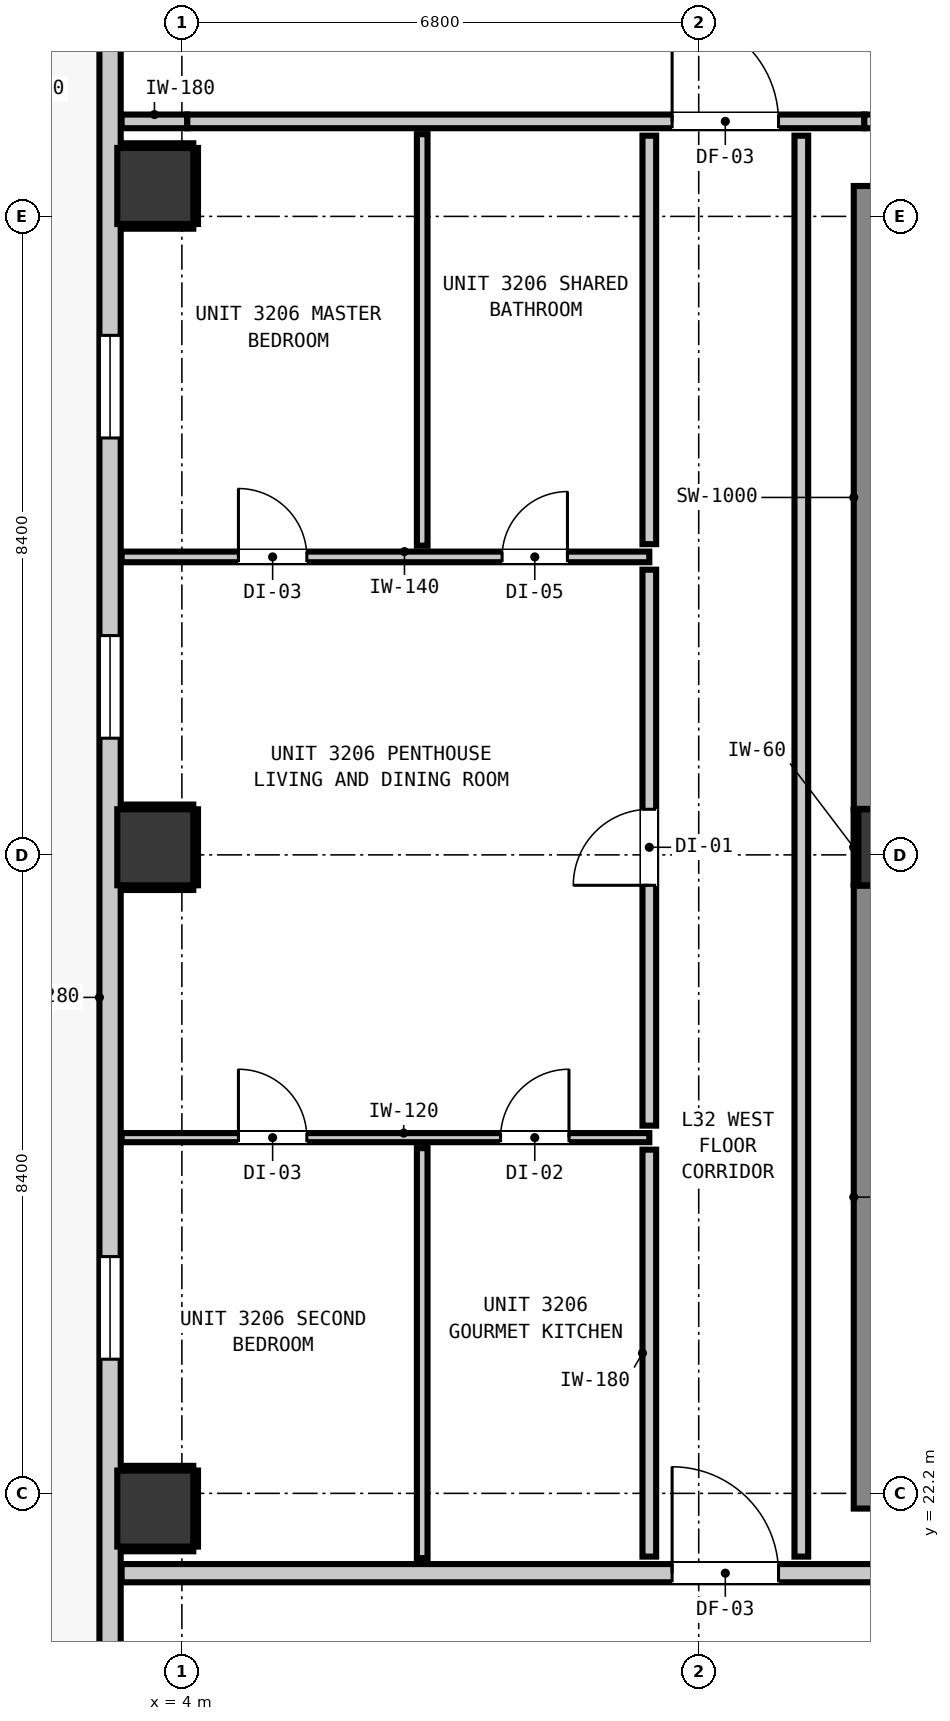
"""IFC4 building model, lengths in metres.
Left out: names, types, materials, properties, quantities, classifications, styles, units other than length and angle.
Written with IfcOpenShell. Run it as: python <this file> out.ifc"""

import sys

from ifc_helpers import new_model, si_unit, direction, frame, frame_2d, origin, origin_2d, place, context, subcontext, project, spatial, rectangle, extrude, element, fill, save


model = new_model("IFC4")
c1 = context("Model", 3, precision=1e-05, world=origin(), true_north=direction((0.0, 1.0)))
c2 = subcontext(c1, "Body", "Model", "MODEL_VIEW")
j1 = project(units=[si_unit("LENGTHUNIT", "METRE"), si_unit("PLANEANGLEUNIT", "RADIAN")], contexts=[c1])
p1 = place(None, origin())
s1 = spatial("IfcSite", under=j1, at=p1, CompositionType="ELEMENT")
p2 = place(p1, origin())
s2 = spatial("IfcBuilding", under=s1, at=p2, CompositionType="ELEMENT")
p3 = place(p2, frame((0.0, 0.0, 112.72)))
s3 = spatial("IfcBuildingStorey", under=s2, at=p3, CompositionType="ELEMENT", Elevation=112.72)
p4 = place(p3, frame((13.4, 30.7, 0.0), z_axis=(0.0, 0.0, 1.0), x_axis=(1.0, 0.0, 0.0)))
e1 = element("IfcColumn", 1, at=p4, inside=s3, PredefinedType="COLUMN", context=c2, shape_type="SweptSolid", body=[
    extrude(rectangle(XDim=1.0, YDim=1.0, at=origin_2d()), origin(), (0.0, 0.0, 1.0), 3.32),
])
p5 = place(p3, frame((13.34, 22.0, 0.0), z_axis=(0.0, 0.0, 1.0), x_axis=(0.0, 1.0, 0.0)))
e2 = element("IfcWall", 2, at=p5, inside=s3, PredefinedType="SHEAR", context=c2, shape_type="SweptSolid", body=[
    extrude(rectangle(XDim=8.195, YDim=1.0, at=frame_2d((4.098, 0.0))), origin(), (0.0, 0.0, 1.0), 3.32),
])
p6 = place(p3, frame((13.34, 31.205, 0.0), z_axis=(0.0, 0.0, 1.0), x_axis=(0.0, 1.0, 0.0)))
e3 = element("IfcWall", 3, at=p6, inside=s3, PredefinedType="SHEAR", context=c2, shape_type="SweptSolid", body=[
    extrude(rectangle(XDim=8.195, YDim=1.0, at=frame_2d((4.097, 0.0))), origin(), (0.0, 0.0, 1.0), 3.32),
])
for number, where, z_axis, x_axis in (
    (4, (3.65, 22.0, 0.0), (0.0, 0.0, 1.0), (1.0, 0.0, 0.0)),
    (5, (3.65, 30.7, 0.0), (0.0, 0.0, 1.0), (1.0, 0.0, 0.0)),
    (6, (3.65, 39.4, 0.0), (0.0, 0.0, 1.0), (1.0, 0.0, 0.0)),
):
    element("IfcColumn", number, at=place(p3, frame(where, z_axis=z_axis, x_axis=x_axis)), inside=s3, PredefinedType="COLUMN", context=c2, shape_type="SweptSolid", body=[
        extrude(rectangle(XDim=1.0, YDim=1.0, at=origin_2d()), origin(), (0.0, 0.0, 1.0), 3.32),
    ])
p7 = place(p3, frame((3.055, 11.355, 0.0), z_axis=(0.0, 0.0, 1.0), x_axis=(0.0, 1.0, 0.0)))
e7 = element("IfcWall", 7, at=p7, inside=s3, PredefinedType="STANDARD", context=c2, shape_type="SweptSolid", body=[
    extrude(rectangle(XDim=32.29, YDim=0.28, at=frame_2d((16.145, 0.0))), origin(), (0.0, 0.0, 1.0), 3.08),
])
p8 = place(p7, frame((5.818, 0.0, 0.0)))
e8 = element("IfcOpeningElement", 8, at=p8, cuts=e7, PredefinedType="OPENING", context=c2, shape_type="SweptSolid", body=[
    extrude(rectangle(XDim=1.0, YDim=2.15, at=frame_2d((0.5, 1.075))), frame((0.0, 0.15, 0.0), z_axis=(0.0, -1.0, 0.0), x_axis=(1.0, 0.0, 0.0)), (0.0, 0.0, 1.0), 0.3),
])
p9 = place(p7, frame((0.395, 0.0, 0.85)))
e9 = element("IfcOpeningElement", 9, at=p9, cuts=e7, PredefinedType="OPENING", context=c2, shape_type="SweptSolid", body=[
    extrude(rectangle(XDim=1.35, YDim=1.85, at=frame_2d((0.675, 0.925))), frame((0.0, 0.15, 0.0), z_axis=(0.0, -1.0, 0.0), x_axis=(1.0, 0.0, 0.0)), (0.0, 0.0, 1.0), 0.3),
])
p10 = place(p7, frame((20.78, 0.0, 0.85)))
e10 = element("IfcOpeningElement", 10, at=p10, cuts=e7, PredefinedType="OPENING", context=c2, shape_type="SweptSolid", body=[
    extrude(rectangle(XDim=1.35, YDim=1.85, at=frame_2d((0.675, 0.925))), frame((0.0, 0.15, 0.0), z_axis=(0.0, -1.0, 0.0), x_axis=(1.0, 0.0, 0.0)), (0.0, 0.0, 1.0), 0.3),
])
p11 = place(p7, frame((12.61, 0.0, 0.85)))
e11 = element("IfcOpeningElement", 11, at=p11, cuts=e7, PredefinedType="OPENING", context=c2, shape_type="SweptSolid", body=[
    extrude(rectangle(XDim=1.35, YDim=1.85, at=frame_2d((0.675, 0.925))), frame((0.0, 0.15, 0.0), z_axis=(0.0, -1.0, 0.0), x_axis=(1.0, 0.0, 0.0)), (0.0, 0.0, 1.0), 0.3),
])
p12 = place(p7, frame((24.73, 0.0, 0.85)))
e12 = element("IfcOpeningElement", 12, at=p12, cuts=e7, PredefinedType="OPENING", context=c2, shape_type="SweptSolid", body=[
    extrude(rectangle(XDim=1.35, YDim=1.85, at=frame_2d((0.675, 0.925))), frame((0.0, 0.15, 0.0), z_axis=(0.0, -1.0, 0.0), x_axis=(1.0, 0.0, 0.0)), (0.0, 0.0, 1.0), 0.3),
])
p13 = place(p3, frame((3.207, 21.15, 0.0), z_axis=(0.0, 0.0, 1.0), x_axis=(1.0, 0.0, 0.0)))
e13 = element("IfcWall", 13, at=p13, inside=s3, PredefinedType="PARTITIONING", context=c2, shape_type="SweptSolid", body=[
    extrude(rectangle(XDim=39.386, YDim=0.24, at=frame_2d((19.693, 0.0))), origin(), (0.0, 0.0, 1.0), 3.08),
])
p14 = place(p13, frame((15.003, 0.0, 0.0)))
e14 = element("IfcOpeningElement", 14, at=p14, cuts=e13, PredefinedType="OPENING", context=c2, shape_type="SweptSolid", body=[
    extrude(rectangle(XDim=1.1, YDim=2.15, at=frame_2d((0.55, 1.075))), frame((0.0, 0.13, 0.0), z_axis=(0.0, -1.0, 0.0), x_axis=(1.0, 0.0, 0.0)), (0.0, 0.0, 1.0), 0.26),
])
p15 = place(p13, frame((7.243, 0.0, 0.0)))
e15 = element("IfcOpeningElement", 15, at=p15, cuts=e13, PredefinedType="OPENING", context=c2, shape_type="SweptSolid", body=[
    extrude(rectangle(XDim=1.4, YDim=2.15, at=frame_2d((0.7, 1.075))), frame((0.0, 0.13, 0.0), z_axis=(0.0, -1.0, 0.0), x_axis=(1.0, 0.0, 0.0)), (0.0, 0.0, 1.0), 0.26),
])
p16 = place(p13, frame((34.843, 0.0, 0.0)))
e16 = element("IfcOpeningElement", 16, at=p16, cuts=e13, PredefinedType="OPENING", context=c2, shape_type="SweptSolid", body=[
    extrude(rectangle(XDim=1.4, YDim=2.15, at=frame_2d((0.7, 1.075))), frame((0.0, 0.13, 0.0), z_axis=(0.0, -1.0, 0.0), x_axis=(1.0, 0.0, 0.0)), (0.0, 0.0, 1.0), 0.26),
])
p17 = place(p3, frame((3.207, 40.25, 0.0), z_axis=(0.0, 0.0, 1.0), x_axis=(1.0, 0.0, 0.0)))
e17 = element("IfcWall", 17, at=p17, inside=s3, PredefinedType="PARTITIONING", context=c2, shape_type="SweptSolid", body=[
    extrude(rectangle(XDim=0.864, YDim=0.18, at=frame_2d((0.432, 0.0))), origin(), (0.0, 0.0, 1.0), 3.08),
])
p18 = place(p3, frame((4.071, 40.25, 0.0), z_axis=(0.0, 0.0, 1.0), x_axis=(1.0, 0.0, 0.0)))
e18 = element("IfcWall", 18, at=p18, inside=s3, PredefinedType="PARTITIONING", context=c2, shape_type="SweptSolid", body=[
    extrude(rectangle(XDim=8.908, YDim=0.18, at=frame_2d((4.454, 0.0))), origin(), (0.0, 0.0, 1.0), 2.565),
])
p19 = place(p18, frame((6.379, 0.0, 0.0)))
e19 = element("IfcOpeningElement", 19, at=p19, cuts=e18, PredefinedType="OPENING", context=c2, shape_type="SweptSolid", body=[
    extrude(rectangle(XDim=1.4, YDim=2.15, at=frame_2d((0.7, 1.075))), frame((0.0, 0.1, 0.0), z_axis=(0.0, -1.0, 0.0), x_axis=(1.0, 0.0, 0.0)), (0.0, 0.0, 1.0), 0.2),
])
p20 = place(p3, frame((12.979, 40.25, 0.0), z_axis=(0.0, 0.0, 1.0), x_axis=(1.0, 0.0, 0.0)))
e20 = element("IfcWall", 20, at=p20, inside=s3, PredefinedType="PARTITIONING", context=c2, shape_type="SweptSolid", body=[
    extrude(rectangle(XDim=29.614, YDim=0.18, at=frame_2d((14.807, 0.0))), origin(), (0.0, 0.0, 1.0), 3.08),
])
p21 = place(p20, frame((4.456, 0.0, 0.0)))
e21 = element("IfcOpeningElement", 21, at=p21, cuts=e20, PredefinedType="OPENING", context=c2, shape_type="SweptSolid", body=[
    extrude(rectangle(XDim=1.4, YDim=2.15, at=frame_2d((0.7, 1.075))), frame((0.0, 0.1, 0.0), z_axis=(0.0, -1.0, 0.0), x_axis=(1.0, 0.0, 0.0)), (0.0, 0.0, 1.0), 0.2),
])
p22 = place(p20, frame((25.071, 0.0, 0.0)))
e22 = element("IfcOpeningElement", 22, at=p22, cuts=e20, PredefinedType="OPENING", context=c2, shape_type="SweptSolid", body=[
    extrude(rectangle(XDim=1.4, YDim=2.15, at=frame_2d((0.7, 1.075))), frame((0.0, 0.1, 0.0), z_axis=(0.0, -1.0, 0.0), x_axis=(1.0, 0.0, 0.0)), (0.0, 0.0, 1.0), 0.2),
])
p23 = place(p3, frame((3.207, 34.52, 0.0), z_axis=(0.0, 0.0, 1.0), x_axis=(1.0, 0.0, 0.0)))
e23 = element("IfcWall", 23, at=p23, inside=s3, PredefinedType="PARTITIONING", context=c2, shape_type="SweptSolid", body=[
    extrude(rectangle(XDim=6.943, YDim=0.14, at=frame_2d((3.471, 0.0))), origin(), (0.0, 0.0, 1.0), 3.08),
])
p24 = place(p23, frame((5.006, 0.0, 0.0)))
e24 = element("IfcOpeningElement", 24, at=p24, cuts=e23, PredefinedType="OPENING", context=c2, shape_type="SweptSolid", body=[
    extrude(rectangle(XDim=0.86, YDim=2.02, at=frame_2d((0.43, 1.01))), frame((0.0, 0.08, 0.0), z_axis=(0.0, -1.0, 0.0), x_axis=(1.0, 0.0, 0.0)), (0.0, 0.0, 1.0), 0.16),
])
p25 = place(p23, frame((1.537, 0.0, 0.0)))
e25 = element("IfcOpeningElement", 25, at=p25, cuts=e23, PredefinedType="OPENING", context=c2, shape_type="SweptSolid", body=[
    extrude(rectangle(XDim=0.9, YDim=2.1, at=frame_2d((0.45, 1.05))), frame((0.0, 0.08, 0.0), z_axis=(0.0, -1.0, 0.0), x_axis=(1.0, 0.0, 0.0)), (0.0, 0.0, 1.0), 0.16),
])
p26 = place(p3, frame((3.207, 26.88, 0.0), z_axis=(0.0, 0.0, 1.0), x_axis=(1.0, 0.0, 0.0)))
e26 = element("IfcWall", 26, at=p26, inside=s3, PredefinedType="PARTITIONING", context=c2, shape_type="SweptSolid", body=[
    extrude(rectangle(XDim=6.943, YDim=0.12, at=frame_2d((3.471, 0.0))), origin(), (0.0, 0.0, 1.0), 3.08),
])
p27 = place(p26, frame((4.986, 0.0, 0.0)))
e27 = element("IfcOpeningElement", 27, at=p27, cuts=e26, PredefinedType="OPENING", context=c2, shape_type="SweptSolid", body=[
    extrude(rectangle(XDim=0.9, YDim=2.1, at=frame_2d((0.45, 1.05))), frame((0.0, 0.07, 0.0), z_axis=(0.0, -1.0, 0.0), x_axis=(1.0, 0.0, 0.0)), (0.0, 0.0, 1.0), 0.14),
])
p28 = place(p26, frame((1.537, 0.0, 0.0)))
e28 = element("IfcOpeningElement", 28, at=p28, cuts=e26, PredefinedType="OPENING", context=c2, shape_type="SweptSolid", body=[
    extrude(rectangle(XDim=0.9, YDim=2.1, at=frame_2d((0.45, 1.05))), frame((0.0, 0.07, 0.0), z_axis=(0.0, -1.0, 0.0), x_axis=(1.0, 0.0, 0.0)), (0.0, 0.0, 1.0), 0.14),
])
p29 = place(p3, frame((10.15, 21.368, 0.0), z_axis=(0.0, 0.0, 1.0), x_axis=(0.0, 1.0, 0.0)))
e29 = element("IfcWall", 29, at=p29, inside=s3, PredefinedType="PARTITIONING", context=c2, shape_type="SweptSolid", body=[
    extrude(rectangle(XDim=5.354, YDim=0.18, at=frame_2d((2.677, 0.0))), origin(), (0.0, 0.0, 1.0), 3.08),
])
p30 = place(p3, frame((10.15, 27.038, 0.0), z_axis=(0.0, 0.0, 1.0), x_axis=(0.0, 1.0, 0.0)))
e30 = element("IfcWall", 30, at=p30, inside=s3, PredefinedType="PARTITIONING", context=c2, shape_type="SweptSolid", body=[
    extrude(rectangle(XDim=7.314, YDim=0.18, at=frame_2d((3.657, 0.0))), origin(), (0.0, 0.0, 1.0), 3.08),
])
p31 = place(p30, frame((3.162, 0.0, 0.0)))
e31 = element("IfcOpeningElement", 31, at=p31, cuts=e30, PredefinedType="OPENING", context=c2, shape_type="SweptSolid", body=[
    extrude(rectangle(XDim=1.0, YDim=2.15, at=frame_2d((0.5, 1.075))), frame((0.0, 0.1, 0.0), z_axis=(0.0, -1.0, 0.0), x_axis=(1.0, 0.0, 0.0)), (0.0, 0.0, 1.0), 0.2),
])
p32 = place(p3, frame((10.15, 34.688, 0.0), z_axis=(0.0, 0.0, 1.0), x_axis=(0.0, 1.0, 0.0)))
e32 = element("IfcWall", 32, at=p32, inside=s3, PredefinedType="PARTITIONING", context=c2, shape_type="SweptSolid", body=[
    extrude(rectangle(XDim=5.374, YDim=0.18, at=frame_2d((2.687, 0.0))), origin(), (0.0, 0.0, 1.0), 3.08),
])
p33 = place(p3, frame((12.15, 21.368, 0.0), z_axis=(0.0, 0.0, 1.0), x_axis=(0.0, 1.0, 0.0)))
e33 = element("IfcWall", 33, at=p33, inside=s3, PredefinedType="PARTITIONING", context=c2, shape_type="SweptSolid", body=[
    extrude(rectangle(XDim=18.694, YDim=0.18, at=frame_2d((9.347, 0.0))), origin(), (0.0, 0.0, 1.0), 3.08),
])
p34 = place(p3, frame((7.162, 21.348, 0.0), z_axis=(0.0, 0.0, 1.0), x_axis=(0.0, 1.0, 0.0)))
e34 = element("IfcWall", 34, at=p34, inside=s3, PredefinedType="PARTITIONING", context=c2, shape_type="SweptSolid", body=[
    extrude(rectangle(XDim=5.394, YDim=0.14, at=frame_2d((2.697, 0.0))), origin(), (0.0, 0.0, 1.0), 3.08),
])
p35 = place(p3, frame((7.162, 34.668, 0.0), z_axis=(0.0, 0.0, 1.0), x_axis=(0.0, 1.0, 0.0)))
e35 = element("IfcWall", 35, at=p35, inside=s3, PredefinedType="PARTITIONING", context=c2, shape_type="SweptSolid", body=[
    extrude(rectangle(XDim=5.414, YDim=0.14, at=frame_2d((2.707, 0.0))), origin(), (0.0, 0.0, 1.0), 3.08),
])
p36 = place(p3, frame((12.868, 30.21, 0.0), z_axis=(0.0, 0.0, 1.0), x_axis=(0.0, 1.0, 0.0)))
e36 = element("IfcWall", 36, at=p36, inside=s3, PredefinedType="PARTITIONING", context=c2, shape_type="SweptSolid", body=[
    extrude(rectangle(XDim=0.98, YDim=0.06, at=frame_2d((0.49, 0.0))), origin(), (0.0, 0.0, 1.0), 1.45),
])
for number, where, z_axis, x_axis in (
    (37, (3.21, 21.468, 0.0), (0.0, 0.0, 1.0), (1.0, 0.0, 0.0)),
    (38, (3.21, 22.532, 0.0), (0.0, 0.0, 1.0), (1.0, 0.0, 0.0)),
):
    element("IfcWall", number, at=place(p3, frame(where, z_axis=z_axis, x_axis=x_axis)), inside=s3, PredefinedType="PARTITIONING", context=c2, shape_type="SweptSolid", body=[
        extrude(rectangle(XDim=0.94, YDim=0.06, at=frame_2d((0.47, 0.0))), origin(), (0.0, 0.0, 1.0), 1.45),
    ])
p37 = place(p3, frame((4.182, 21.5, 0.0), z_axis=(0.0, 0.0, 1.0), x_axis=(0.0, 1.0, 0.0)))
e39 = element("IfcWall", 39, at=p37, inside=s3, PredefinedType="PARTITIONING", context=c2, shape_type="SweptSolid", body=[
    extrude(rectangle(XDim=1.0, YDim=0.06, at=frame_2d((0.5, 0.0))), origin(), (0.0, 0.0, 1.0), 1.45),
])
for number, where, z_axis, x_axis in (
    (40, (3.21, 30.168, 0.0), (0.0, 0.0, 1.0), (1.0, 0.0, 0.0)),
    (41, (3.21, 31.232, 0.0), (0.0, 0.0, 1.0), (1.0, 0.0, 0.0)),
):
    element("IfcWall", number, at=place(p3, frame(where, z_axis=z_axis, x_axis=x_axis)), inside=s3, PredefinedType="PARTITIONING", context=c2, shape_type="SweptSolid", body=[
        extrude(rectangle(XDim=0.94, YDim=0.06, at=frame_2d((0.47, 0.0))), origin(), (0.0, 0.0, 1.0), 1.45),
    ])
p38 = place(p3, frame((4.182, 30.2, 0.0), z_axis=(0.0, 0.0, 1.0), x_axis=(0.0, 1.0, 0.0)))
e42 = element("IfcWall", 42, at=p38, inside=s3, PredefinedType="PARTITIONING", context=c2, shape_type="SweptSolid", body=[
    extrude(rectangle(XDim=1.0, YDim=0.06, at=frame_2d((0.5, 0.0))), origin(), (0.0, 0.0, 1.0), 1.45),
])
for number, where, z_axis, x_axis in (
    (43, (3.21, 38.868, 0.0), (0.0, 0.0, 1.0), (1.0, 0.0, 0.0)),
    (44, (3.21, 39.932, 0.0), (0.0, 0.0, 1.0), (1.0, 0.0, 0.0)),
):
    element("IfcWall", number, at=place(p3, frame(where, z_axis=z_axis, x_axis=x_axis)), inside=s3, PredefinedType="PARTITIONING", context=c2, shape_type="SweptSolid", body=[
        extrude(rectangle(XDim=0.94, YDim=0.06, at=frame_2d((0.47, 0.0))), origin(), (0.0, 0.0, 1.0), 1.45),
    ])
p39 = place(p3, frame((4.182, 38.9, 0.0), z_axis=(0.0, 0.0, 1.0), x_axis=(0.0, 1.0, 0.0)))
e45 = element("IfcWall", 45, at=p39, inside=s3, PredefinedType="PARTITIONING", context=c2, shape_type="SweptSolid", body=[
    extrude(rectangle(XDim=1.0, YDim=0.06, at=frame_2d((0.5, 0.0))), origin(), (0.0, 0.0, 1.0), 1.45),
])
p40 = place(p10, origin())
e46 = element("IfcWindow", 46, at=p40, inside=s3, PartitioningType="SINGLE_PANEL", PredefinedType="WINDOW", context=c2, shape_type="SweptSolid", body=[
    extrude(rectangle(XDim=1.35, YDim=1.85, at=frame_2d((0.675, 0.925))), frame((0.0, 0.03, 0.0), z_axis=(0.0, -1.0, 0.0), x_axis=(1.0, 0.0, 0.0)), (0.0, 0.0, 1.0), 0.06),
])
fill(e10, e46)
p41 = place(p11, origin())
e47 = element("IfcWindow", 47, at=p41, inside=s3, PartitioningType="SINGLE_PANEL", PredefinedType="WINDOW", context=c2, shape_type="SweptSolid", body=[
    extrude(rectangle(XDim=1.35, YDim=1.85, at=frame_2d((0.675, 0.925))), frame((0.0, 0.03, 0.0), z_axis=(0.0, -1.0, 0.0), x_axis=(1.0, 0.0, 0.0)), (0.0, 0.0, 1.0), 0.06),
])
fill(e11, e47)
p42 = place(p12, origin())
e48 = element("IfcWindow", 48, at=p42, inside=s3, PartitioningType="SINGLE_PANEL", PredefinedType="WINDOW", context=c2, shape_type="SweptSolid", body=[
    extrude(rectangle(XDim=1.35, YDim=1.85, at=frame_2d((0.675, 0.925))), frame((0.0, 0.03, 0.0), z_axis=(0.0, -1.0, 0.0), x_axis=(1.0, 0.0, 0.0)), (0.0, 0.0, 1.0), 0.06),
])
fill(e12, e48)
p43 = place(p15, origin())
e49 = element("IfcDoor", 49, at=p43, inside=s3, OperationType="SINGLE_SWING_LEFT", PredefinedType="DOOR", context=c2, shape_type="SweptSolid", body=[
    extrude(rectangle(XDim=1.4, YDim=2.15, at=frame_2d((0.7, 1.075))), frame((0.0, 0.025, 0.0), z_axis=(0.0, -1.0, 0.0), x_axis=(1.0, 0.0, 0.0)), (0.0, 0.0, 1.0), 0.05),
])
fill(e15, e49)
p44 = place(p19, origin())
e50 = element("IfcDoor", 50, at=p44, inside=s3, OperationType="SINGLE_SWING_LEFT", PredefinedType="DOOR", context=c2, shape_type="SweptSolid", body=[
    extrude(rectangle(XDim=1.4, YDim=2.15, at=frame_2d((0.7, 1.075))), frame((0.0, 0.025, 0.0), z_axis=(0.0, -1.0, 0.0), x_axis=(1.0, 0.0, 0.0)), (0.0, 0.0, 1.0), 0.05),
])
fill(e19, e50)
p45 = place(p31, origin())
e51 = element("IfcDoor", 51, at=p45, inside=s3, OperationType="SINGLE_SWING_LEFT", PredefinedType="DOOR", context=c2, shape_type="SweptSolid", body=[
    extrude(rectangle(XDim=1.0, YDim=2.15, at=frame_2d((0.5, 1.075))), frame((0.0, 0.025, 0.0), z_axis=(0.0, -1.0, 0.0), x_axis=(1.0, 0.0, 0.0)), (0.0, 0.0, 1.0), 0.05),
])
fill(e31, e51)
p46 = place(p27, origin())
e52 = element("IfcDoor", 52, at=p46, inside=s3, OperationType="SINGLE_SWING_RIGHT", PredefinedType="DOOR", context=c2, shape_type="SweptSolid", body=[
    extrude(rectangle(XDim=0.9, YDim=2.1, at=frame_2d((0.45, 1.05))), frame((0.0, 0.025, 0.0), z_axis=(0.0, -1.0, 0.0), x_axis=(1.0, 0.0, 0.0)), (0.0, 0.0, 1.0), 0.05),
])
fill(e27, e52)
p47 = place(p28, origin())
e53 = element("IfcDoor", 53, at=p47, inside=s3, OperationType="SINGLE_SWING_LEFT", PredefinedType="DOOR", context=c2, shape_type="SweptSolid", body=[
    extrude(rectangle(XDim=0.9, YDim=2.1, at=frame_2d((0.45, 1.05))), frame((0.0, 0.025, 0.0), z_axis=(0.0, -1.0, 0.0), x_axis=(1.0, 0.0, 0.0)), (0.0, 0.0, 1.0), 0.05),
])
fill(e28, e53)
p48 = place(p24, origin())
e54 = element("IfcDoor", 54, at=p48, inside=s3, OperationType="SINGLE_SWING_RIGHT", PredefinedType="DOOR", context=c2, shape_type="SweptSolid", body=[
    extrude(rectangle(XDim=0.86, YDim=2.02, at=frame_2d((0.43, 1.01))), frame((0.0, 0.025, 0.0), z_axis=(0.0, -1.0, 0.0), x_axis=(1.0, 0.0, 0.0)), (0.0, 0.0, 1.0), 0.05),
])
fill(e24, e54)
p49 = place(p25, origin())
e55 = element("IfcDoor", 55, at=p49, inside=s3, OperationType="SINGLE_SWING_LEFT", PredefinedType="DOOR", context=c2, shape_type="SweptSolid", body=[
    extrude(rectangle(XDim=0.9, YDim=2.1, at=frame_2d((0.45, 1.05))), frame((0.0, 0.025, 0.0), z_axis=(0.0, -1.0, 0.0), x_axis=(1.0, 0.0, 0.0)), (0.0, 0.0, 1.0), 0.05),
])
fill(e25, e55)
save(model, sys.argv[1])
